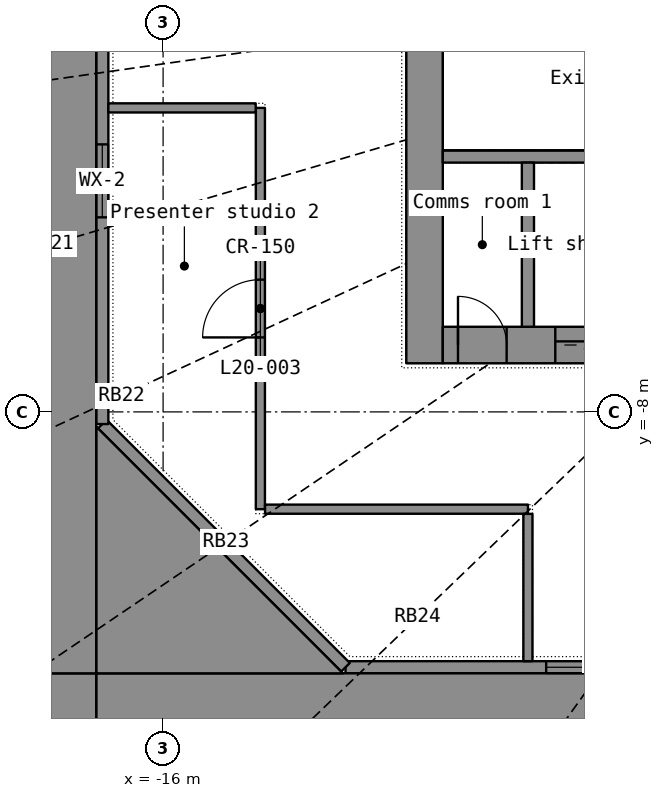
"""IFC4 building model, lengths in metres.
Left out: names, types, materials, properties, quantities, classifications, styles, units other than length and angle.
Written with IfcOpenShell. Run it as: python <this file> out.ifc"""

import sys

from ifc_helpers import new_model, si_unit, direction, frame, frame_2d, origin, place, context, subcontext, project, spatial, polyline, rectangle, outline, extrude, element, fill, save


model = new_model("IFC4")
c1 = context("Model", 3, precision=1e-05, world=origin(), true_north=direction((0.0, 1.0)))
c2 = subcontext(c1, "Body", "Model", "MODEL_VIEW")
j1 = project(units=[si_unit("LENGTHUNIT", "METRE"), si_unit("PLANEANGLEUNIT", "RADIAN")], contexts=[c1])
p1 = place(None, origin())
s1 = spatial("IfcSite", under=j1, at=p1, CompositionType="ELEMENT")
p2 = place(p1, origin())
s2 = spatial("IfcBuilding", under=s1, at=p2, CompositionType="ELEMENT")
p3 = place(p2, frame((0.0, 0.0, 85.2)))
s3 = spatial("IfcBuildingStorey", under=s2, at=p3, CompositionType="ELEMENT", Elevation=85.2)
p4 = place(p3, frame((13.0, -12.2, 0.08), z_axis=(0.0, 0.0, 1.0), x_axis=(-1.0, 0.0, 0.0)))
e1 = element("IfcWall", 1, at=p4, inside=s3, PredefinedType="STANDARD", context=c2, shape_type="SweptSolid", body=[
    extrude(rectangle(XDim=26.0, YDim=0.2, at=frame_2d((13.0, 0.0))), origin(), (0.0, 0.0, 1.0), 7.12),
])
p5 = place(p4, frame((7.1, 0.0, 0.0)))
e2 = element("IfcOpeningElement", 2, at=p5, cuts=e1, PredefinedType="OPENING", context=c2, shape_type="SweptSolid", body=[
    extrude(rectangle(XDim=1.8, YDim=2.4, at=frame_2d((0.9, 1.2))), frame((0.0, 0.11, 0.0), z_axis=(0.0, -1.0, 0.0), x_axis=(1.0, 0.0, 0.0)), (0.0, 0.0, 1.0), 0.22),
])
p6 = place(p4, frame((17.1, 0.0, 0.0)))
e3 = element("IfcOpeningElement", 3, at=p6, cuts=e1, PredefinedType="OPENING", context=c2, shape_type="SweptSolid", body=[
    extrude(rectangle(XDim=1.8, YDim=2.4, at=frame_2d((0.9, 1.2))), frame((0.0, 0.11, 0.0), z_axis=(0.0, -1.0, 0.0), x_axis=(1.0, 0.0, 0.0)), (0.0, 0.0, 1.0), 0.22),
])
p7 = place(p4, frame((3.3, 0.0, 0.9)))
e4 = element("IfcOpeningElement", 4, at=p7, cuts=e1, PredefinedType="OPENING", context=c2, shape_type="SweptSolid", body=[
    extrude(rectangle(XDim=2.4, YDim=1.5, at=frame_2d((1.2, 0.75))), frame((0.0, 0.11, 0.0), z_axis=(0.0, -1.0, 0.0), x_axis=(1.0, 0.0, 0.0)), (0.0, 0.0, 1.0), 0.22),
])
p8 = place(p4, frame((11.8, 0.0, 0.9)))
e5 = element("IfcOpeningElement", 5, at=p8, cuts=e1, PredefinedType="OPENING", context=c2, shape_type="SweptSolid", body=[
    extrude(rectangle(XDim=2.4, YDim=1.5, at=frame_2d((1.2, 0.75))), frame((0.0, 0.11, 0.0), z_axis=(0.0, -1.0, 0.0), x_axis=(1.0, 0.0, 0.0)), (0.0, 0.0, 1.0), 0.22),
])
p9 = place(p4, frame((20.3, 0.0, 0.9)))
e6 = element("IfcOpeningElement", 6, at=p9, cuts=e1, PredefinedType="OPENING", context=c2, shape_type="SweptSolid", body=[
    extrude(rectangle(XDim=2.4, YDim=1.5, at=frame_2d((1.2, 0.75))), frame((0.0, 0.11, 0.0), z_axis=(0.0, -1.0, 0.0), x_axis=(1.0, 0.0, 0.0)), (0.0, 0.0, 1.0), 0.22),
])
p10 = place(p4, frame((6.5, 0.0, 3.2)))
e7 = element("IfcOpeningElement", 7, at=p10, cuts=e1, PredefinedType="OPENING", context=c2, shape_type="SweptSolid", body=[
    extrude(rectangle(XDim=3.0, YDim=1.0, at=frame_2d((1.5, 0.5))), frame((0.0, 0.11, 0.0), z_axis=(0.0, -1.0, 0.0), x_axis=(1.0, 0.0, 0.0)), (0.0, 0.0, 1.0), 0.22),
])
p11 = place(p4, frame((16.5, 0.0, 3.2)))
e8 = element("IfcOpeningElement", 8, at=p11, cuts=e1, PredefinedType="OPENING", context=c2, shape_type="SweptSolid", body=[
    extrude(rectangle(XDim=3.0, YDim=1.0, at=frame_2d((1.5, 0.5))), frame((0.0, 0.11, 0.0), z_axis=(0.0, -1.0, 0.0), x_axis=(1.0, 0.0, 0.0)), (0.0, 0.0, 1.0), 0.22),
])
p12 = place(p3, frame((-13.0, -12.2, 0.08), z_axis=(0.0, 0.0, 1.0), x_axis=(-0.707106781, 0.707106781, 0.0)))
e9 = element("IfcWall", 9, at=p12, inside=s3, PredefinedType="STANDARD", context=c2, shape_type="SweptSolid", body=[
    extrude(rectangle(XDim=5.657, YDim=0.2, at=frame_2d((2.828, 0.0))), origin(), (0.0, 0.0, 1.0), 7.12),
])
p13 = place(p3, frame((-17.0, -8.2, 0.08), z_axis=(0.0, 0.0, 1.0), x_axis=(0.0, 1.0, 0.0)))
e10 = element("IfcWall", 10, at=p13, inside=s3, PredefinedType="STANDARD", context=c2, shape_type="SweptSolid", body=[
    extrude(rectangle(XDim=16.4, YDim=0.2, at=frame_2d((8.2, 0.0))), origin(), (0.0, 0.0, 1.0), 7.12),
])
p14 = place(p13, frame((7.3, 0.0, 0.0)))
e11 = element("IfcOpeningElement", 11, at=p14, cuts=e10, PredefinedType="OPENING", context=c2, shape_type="SweptSolid", body=[
    extrude(rectangle(XDim=1.8, YDim=2.4, at=frame_2d((0.9, 1.2))), frame((0.0, 0.11, 0.0), z_axis=(0.0, -1.0, 0.0), x_axis=(1.0, 0.0, 0.0)), (0.0, 0.0, 1.0), 0.22),
])
p15 = place(p13, frame((3.4, 0.0, 0.1)))
e12 = element("IfcOpeningElement", 12, at=p15, cuts=e10, PredefinedType="OPENING", context=c2, shape_type="SweptSolid", body=[
    extrude(rectangle(XDim=1.2, YDim=2.2, at=frame_2d((0.6, 1.1))), frame((0.0, 0.11, 0.0), z_axis=(0.0, -1.0, 0.0), x_axis=(1.0, 0.0, 0.0)), (0.0, 0.0, 1.0), 0.22),
])
p16 = place(p13, frame((11.8, 0.0, 0.1)))
e13 = element("IfcOpeningElement", 13, at=p16, cuts=e10, PredefinedType="OPENING", context=c2, shape_type="SweptSolid", body=[
    extrude(rectangle(XDim=1.2, YDim=2.2, at=frame_2d((0.6, 1.1))), frame((0.0, 0.11, 0.0), z_axis=(0.0, -1.0, 0.0), x_axis=(1.0, 0.0, 0.0)), (0.0, 0.0, 1.0), 0.22),
])
p17 = place(p3, frame((0.0, 0.0, -0.4)))
e14 = element("IfcWall", 14, at=p17, inside=s3, PredefinedType="ELEMENTEDWALL", context=c2, shape_type="SweptSolid", body=[
    extrude(outline(polyline([(-8.017, -19.509), (-6.569, -19.879), (-5.9, -20.0), (-5.9, -12.3), (-13.042, -12.3), (-17.1, -12.3), (-17.1, -15.177), (-15.791, -15.177), (-15.791, -16.091), (-14.557, -16.859), (-13.927, -17.184), (-13.927, -16.77), (-11.726, -16.77), (-11.726, -18.23), (-10.726, -18.652), (-9.717, -18.991), (-9.717, -18.853), (-8.017, -18.853), (-8.017, -19.509)])), origin(), (0.0, 0.0, 1.0), 1.58),
])
p18 = place(p3, frame((0.0, 0.0, -0.4)))
e15 = element("IfcWall", 15, at=p18, inside=s3, PredefinedType="ELEMENTEDWALL", context=c2, shape_type="SweptSolid", body=[
    extrude(outline(polyline([(-17.1, -15.177), (-17.1, -12.3), (-20.321, -12.3), (-20.056, -12.579), (-18.963, -12.579), (-18.963, -13.653), (-17.946, -14.553), (-17.105, -15.177), (-17.1, -15.177)])), origin(), (0.0, 0.0, 1.0), 1.58),
])
p19 = place(p3, frame((0.0, 0.0, -0.4)))
e16 = element("IfcWall", 16, at=p19, inside=s3, PredefinedType="ELEMENTEDWALL", context=c2, shape_type="SweptSolid", body=[
    extrude(outline(polyline([(-17.1, -8.241), (-17.1, -12.3), (-13.042, -12.3), (-17.1, -8.241)])), origin(), (0.0, 0.0, 1.0), 1.58),
])
p20 = place(p3, frame((0.0, 0.0, -0.4)))
e17 = element("IfcWall", 17, at=p20, inside=s3, PredefinedType="ELEMENTEDWALL", context=c2, shape_type="SweptSolid", body=[
    extrude(outline(polyline([(-20.321, -12.3), (-17.1, -12.3), (-17.1, -8.241), (-17.1, -0.9), (-24.393, -0.9), (-24.393, -1.1), (-25.32, -1.1), (-25.283, -1.794), (-25.125, -2.764), (-24.557, -2.764), (-24.557, -4.464), (-24.75, -4.464), (-24.515, -5.327), (-24.146, -6.275), (-23.409, -6.275), (-23.409, -7.901), (-23.001, -8.698), (-22.706, -9.158), (-21.031, -9.158), (-21.031, -11.358), (-21.14, -11.358), (-20.79, -11.804), (-20.321, -12.3)])), origin(), (0.0, 0.0, 1.0), 1.58),
])
p21 = place(p3, frame((-11.7, -7.2, 0.0), z_axis=(0.0, 0.0, 1.0), x_axis=(0.0, 1.0, 0.0)))
e18 = element("IfcWall", 18, at=p21, inside=s3, PredefinedType="SHEAR", context=c2, shape_type="SweptSolid", body=[
    extrude(rectangle(XDim=14.4, YDim=0.6, at=frame_2d((7.2, 0.0))), origin(), (0.0, 0.0, 1.0), 7.0),
])
p22 = place(p21, frame((6.5, 0.0, 0.0)))
e19 = element("IfcOpeningElement", 19, at=p22, cuts=e18, PredefinedType="OPENING", context=c2, shape_type="SweptSolid", body=[
    extrude(rectangle(XDim=1.4, YDim=2.2, at=frame_2d((0.7, 1.1))), frame((0.0, 0.31, 0.0), z_axis=(0.0, -1.0, 0.0), x_axis=(1.0, 0.0, 0.0)), (0.0, 0.0, 1.0), 0.62),
])
p23 = place(p3, frame((-11.4, -6.9, 0.0), z_axis=(0.0, 0.0, 1.0), x_axis=(1.0, 0.0, 0.0)))
e20 = element("IfcWall", 20, at=p23, inside=s3, PredefinedType="SHEAR", context=c2, shape_type="SweptSolid", body=[
    extrude(rectangle(XDim=22.8, YDim=0.6, at=frame_2d((11.4, 0.0))), origin(), (0.0, 0.0, 1.0), 7.0),
])
p24 = place(p23, frame((1.85, 0.0, 0.0)))
e21 = element("IfcOpeningElement", 21, at=p24, cuts=e20, PredefinedType="OPENING", context=c2, shape_type="SweptSolid", body=[
    extrude(rectangle(XDim=1.1, YDim=2.2, at=frame_2d((0.55, 1.1))), frame((0.0, 0.31, 0.0), z_axis=(0.0, -1.0, 0.0), x_axis=(1.0, 0.0, 0.0)), (0.0, 0.0, 1.0), 0.62),
])
p25 = place(p23, frame((3.85, 0.0, 0.0)))
e22 = element("IfcOpeningElement", 22, at=p25, cuts=e20, PredefinedType="OPENING", context=c2, shape_type="SweptSolid", body=[
    extrude(rectangle(XDim=1.1, YDim=2.2, at=frame_2d((0.55, 1.1))), frame((0.0, 0.31, 0.0), z_axis=(0.0, -1.0, 0.0), x_axis=(1.0, 0.0, 0.0)), (0.0, 0.0, 1.0), 0.62),
])
p26 = place(p23, frame((5.85, 0.0, 0.0)))
e23 = element("IfcOpeningElement", 23, at=p26, cuts=e20, PredefinedType="OPENING", context=c2, shape_type="SweptSolid", body=[
    extrude(rectangle(XDim=1.1, YDim=2.2, at=frame_2d((0.55, 1.1))), frame((0.0, 0.31, 0.0), z_axis=(0.0, -1.0, 0.0), x_axis=(1.0, 0.0, 0.0)), (0.0, 0.0, 1.0), 0.62),
])
p27 = place(p23, frame((7.85, 0.0, 0.0)))
e24 = element("IfcOpeningElement", 24, at=p27, cuts=e20, PredefinedType="OPENING", context=c2, shape_type="SweptSolid", body=[
    extrude(rectangle(XDim=1.1, YDim=2.2, at=frame_2d((0.55, 1.1))), frame((0.0, 0.31, 0.0), z_axis=(0.0, -1.0, 0.0), x_axis=(1.0, 0.0, 0.0)), (0.0, 0.0, 1.0), 0.62),
])
p28 = place(p23, frame((9.85, 0.0, 0.0)))
e25 = element("IfcOpeningElement", 25, at=p28, cuts=e20, PredefinedType="OPENING", context=c2, shape_type="SweptSolid", body=[
    extrude(rectangle(XDim=1.1, YDim=2.2, at=frame_2d((0.55, 1.1))), frame((0.0, 0.31, 0.0), z_axis=(0.0, -1.0, 0.0), x_axis=(1.0, 0.0, 0.0)), (0.0, 0.0, 1.0), 0.62),
])
p29 = place(p23, frame((11.85, 0.0, 0.0)))
e26 = element("IfcOpeningElement", 26, at=p29, cuts=e20, PredefinedType="OPENING", context=c2, shape_type="SweptSolid", body=[
    extrude(rectangle(XDim=1.1, YDim=2.2, at=frame_2d((0.55, 1.1))), frame((0.0, 0.31, 0.0), z_axis=(0.0, -1.0, 0.0), x_axis=(1.0, 0.0, 0.0)), (0.0, 0.0, 1.0), 0.62),
])
p30 = place(p23, frame((13.85, 0.0, 0.0)))
e27 = element("IfcOpeningElement", 27, at=p30, cuts=e20, PredefinedType="OPENING", context=c2, shape_type="SweptSolid", body=[
    extrude(rectangle(XDim=1.1, YDim=2.2, at=frame_2d((0.55, 1.1))), frame((0.0, 0.31, 0.0), z_axis=(0.0, -1.0, 0.0), x_axis=(1.0, 0.0, 0.0)), (0.0, 0.0, 1.0), 0.62),
])
p31 = place(p23, frame((15.85, 0.0, 0.0)))
e28 = element("IfcOpeningElement", 28, at=p31, cuts=e20, PredefinedType="OPENING", context=c2, shape_type="SweptSolid", body=[
    extrude(rectangle(XDim=1.1, YDim=2.2, at=frame_2d((0.55, 1.1))), frame((0.0, 0.31, 0.0), z_axis=(0.0, -1.0, 0.0), x_axis=(1.0, 0.0, 0.0)), (0.0, 0.0, 1.0), 0.62),
])
p32 = place(p23, frame((19.85, 0.0, 0.0)))
e29 = element("IfcOpeningElement", 29, at=p32, cuts=e20, PredefinedType="OPENING", context=c2, shape_type="SweptSolid", body=[
    extrude(rectangle(XDim=1.1, YDim=2.2, at=frame_2d((0.55, 1.1))), frame((0.0, 0.31, 0.0), z_axis=(0.0, -1.0, 0.0), x_axis=(1.0, 0.0, 0.0)), (0.0, 0.0, 1.0), 0.62),
])
p33 = place(p23, frame((0.25, 0.0, 0.0)))
e30 = element("IfcOpeningElement", 30, at=p33, cuts=e20, PredefinedType="OPENING", context=c2, shape_type="SweptSolid", body=[
    extrude(rectangle(XDim=0.8, YDim=2.05, at=frame_2d((0.4, 1.025))), frame((0.0, 0.31, 0.0), z_axis=(0.0, -1.0, 0.0), x_axis=(1.0, 0.0, 0.0)), (0.0, 0.0, 1.0), 0.62),
])
p34 = place(p23, frame((21.75, 0.0, 0.0)))
e31 = element("IfcOpeningElement", 31, at=p34, cuts=e20, PredefinedType="OPENING", context=c2, shape_type="SweptSolid", body=[
    extrude(rectangle(XDim=0.8, YDim=2.05, at=frame_2d((0.4, 1.025))), frame((0.0, 0.31, 0.0), z_axis=(0.0, -1.0, 0.0), x_axis=(1.0, 0.0, 0.0)), (0.0, 0.0, 1.0), 0.62),
])
p35 = place(p3, frame((-11.4, -3.8, 0.0), z_axis=(0.0, 0.0, 1.0), x_axis=(1.0, 0.0, 0.0)))
e32 = element("IfcWall", 32, at=p35, inside=s3, PredefinedType="SHEAR", context=c2, shape_type="SweptSolid", body=[
    extrude(rectangle(XDim=22.8, YDim=0.2, at=frame_2d((11.4, 0.0))), origin(), (0.0, 0.0, 1.0), 7.0),
])
p36 = place(p3, frame((-10.0, -6.6, 0.0), z_axis=(0.0, 0.0, 1.0), x_axis=(0.0, 1.0, 0.0)))
e33 = element("IfcWall", 33, at=p36, inside=s3, PredefinedType="SHEAR", context=c2, shape_type="SweptSolid", body=[
    extrude(rectangle(XDim=2.7, YDim=0.2, at=frame_2d((1.35, 0.0))), origin(), (0.0, 0.0, 1.0), 7.0),
])
p37 = place(p3, frame((-14.4, -9.6, 0.0), z_axis=(0.0, 0.0, 1.0), x_axis=(0.0, 1.0, 0.0)))
e34 = element("IfcWall", 34, at=p37, inside=s3, PredefinedType="PARTITIONING", context=c2, shape_type="SweptSolid", body=[
    extrude(rectangle(XDim=6.6, YDim=0.15, at=frame_2d((3.3, 0.0))), origin(), (0.0, 0.0, 1.0), 6.1),
])
p38 = place(p37, frame((2.825, 0.0, 0.0)))
e35 = element("IfcOpeningElement", 35, at=p38, cuts=e34, PredefinedType="OPENING", context=c2, shape_type="SweptSolid", body=[
    extrude(rectangle(XDim=0.95, YDim=2.15, at=frame_2d((0.475, 1.075))), frame((0.0, 0.085, 0.0), z_axis=(0.0, -1.0, 0.0), x_axis=(1.0, 0.0, 0.0)), (0.0, 0.0, 1.0), 0.17),
])
p39 = place(p3, frame((-10.0, -9.6, 0.0), z_axis=(0.0, 0.0, 1.0), x_axis=(-1.0, 0.0, 0.0)))
e36 = element("IfcWall", 36, at=p39, inside=s3, PredefinedType="PARTITIONING", context=c2, shape_type="SweptSolid", body=[
    extrude(rectangle(XDim=4.323, YDim=0.15, at=frame_2d((2.162, 0.0))), origin(), (0.0, 0.0, 1.0), 6.1),
])
p40 = place(p3, frame((-10.0, -12.1, 0.0), z_axis=(0.0, 0.0, 1.0), x_axis=(0.0, 1.0, 0.0)))
e37 = element("IfcWall", 37, at=p40, inside=s3, PredefinedType="PARTITIONING", context=c2, shape_type="SweptSolid", body=[
    extrude(rectangle(XDim=2.423, YDim=0.15, at=frame_2d((1.211, 0.0))), origin(), (0.0, 0.0, 1.0), 6.1),
])
p41 = place(p3, frame((-14.477, -3.0, 0.0), z_axis=(0.0, 0.0, 1.0), x_axis=(-1.0, 0.0, 0.0)))
e38 = element("IfcWall", 38, at=p41, inside=s3, PredefinedType="PARTITIONING", context=c2, shape_type="SweptSolid", body=[
    extrude(rectangle(XDim=2.423, YDim=0.15, at=frame_2d((1.211, 0.0))), origin(), (0.0, 0.0, 1.0), 6.1),
])
p42 = place(p9, origin())
e39 = element("IfcWindow", 39, at=p42, inside=s3, PartitioningType="SINGLE_PANEL", PredefinedType="WINDOW", context=c2, shape_type="SweptSolid", body=[
    extrude(rectangle(XDim=2.4, YDim=1.5, at=frame_2d((1.2, 0.75))), frame((0.0, 0.03, 0.0), z_axis=(0.0, -1.0, 0.0), x_axis=(1.0, 0.0, 0.0)), (0.0, 0.0, 1.0), 0.06),
])
fill(e6, e39)
p43 = place(p15, origin())
e40 = element("IfcWindow", 40, at=p43, inside=s3, PartitioningType="SINGLE_PANEL", PredefinedType="WINDOW", context=c2, shape_type="SweptSolid", body=[
    extrude(rectangle(XDim=1.2, YDim=2.2, at=frame_2d((0.6, 1.1))), frame((0.0, 0.03, 0.0), z_axis=(0.0, -1.0, 0.0), x_axis=(1.0, 0.0, 0.0)), (0.0, 0.0, 1.0), 0.06),
])
fill(e12, e40)
p44 = place(p24, origin())
e41 = element("IfcDoor", 41, at=p44, inside=s3, OperationType="DOUBLE_DOOR_SLIDING", PredefinedType="DOOR", context=c2, shape_type="SweptSolid", body=[
    extrude(rectangle(XDim=1.1, YDim=2.2, at=frame_2d((0.55, 1.1))), frame((0.0, 0.025, 0.0), z_axis=(0.0, -1.0, 0.0), x_axis=(1.0, 0.0, 0.0)), (0.0, 0.0, 1.0), 0.05),
])
fill(e21, e41)
p45 = place(p33, origin())
e42 = element("IfcDoor", 42, at=p45, inside=s3, OperationType="SINGLE_SWING_LEFT", PredefinedType="DOOR", context=c2, shape_type="SweptSolid", body=[
    extrude(rectangle(XDim=0.8, YDim=2.05, at=frame_2d((0.4, 1.025))), frame((0.0, 0.025, 0.0), z_axis=(0.0, -1.0, 0.0), x_axis=(1.0, 0.0, 0.0)), (0.0, 0.0, 1.0), 0.05),
])
fill(e30, e42)
p46 = place(p38, origin())
e43 = element("IfcDoor", 43, at=p46, inside=s3, OperationType="SINGLE_SWING_LEFT", PredefinedType="DOOR", context=c2, shape_type="SweptSolid", body=[
    extrude(rectangle(XDim=0.95, YDim=2.15, at=frame_2d((0.475, 1.075))), frame((0.0, 0.025, 0.0), z_axis=(0.0, -1.0, 0.0), x_axis=(1.0, 0.0, 0.0)), (0.0, 0.0, 1.0), 0.05),
])
fill(e35, e43)
save(model, sys.argv[1])
